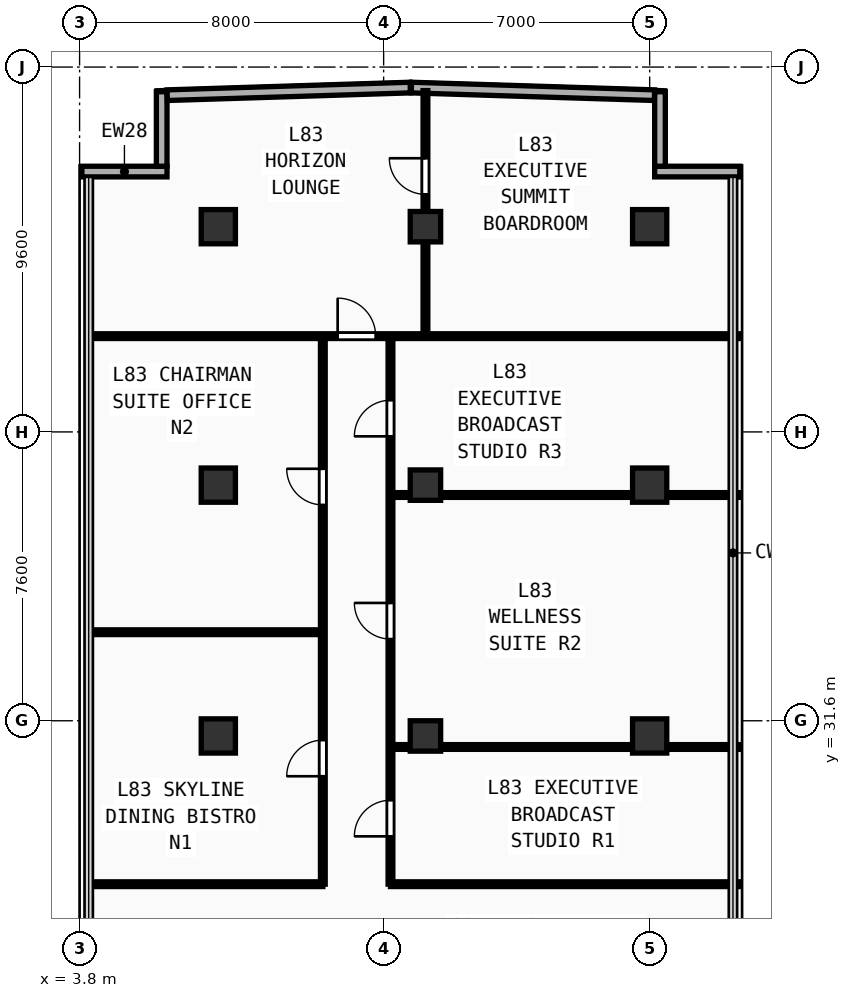
"""IFC4 building model, lengths in metres.
Left out: names, types, materials, properties, quantities, classifications, styles, units other than length and angle.
Written with IfcOpenShell. Run it as: python <this file> out.ifc"""

import sys

from ifc_helpers import new_model, si_unit, direction, frame, frame_2d, origin, origin_2d, place, context, subcontext, project, spatial, rectangle, extrude, element, fill, save


model = new_model("IFC4")
c1 = context("Model", 3, precision=1e-05, world=origin(), true_north=direction((0.0, 1.0)))
c2 = subcontext(c1, "Body", "Model", "MODEL_VIEW")
j1 = project(units=[si_unit("LENGTHUNIT", "METRE"), si_unit("PLANEANGLEUNIT", "RADIAN")], contexts=[c1])
p1 = place(None, origin())
s1 = spatial("IfcSite", under=j1, at=p1, CompositionType="ELEMENT")
p2 = place(p1, origin())
s2 = spatial("IfcBuilding", under=s1, at=p2, CompositionType="ELEMENT")
p3 = place(p2, frame((0.0, 0.0, 323.6)))
s3 = spatial("IfcBuildingStorey", under=s2, at=p3, CompositionType="ELEMENT", Elevation=323.6)
for number, where, z_axis, x_axis in (
    (1, (7.45, 31.2, 0.0), (0.0, 0.0, 1.0), (1.0, 0.0, 0.0)),
    (2, (7.45, 37.8, 0.0), (0.0, 0.0, 1.0), (1.0, 0.0, 0.0)),
    (3, (7.45, 44.6, 0.0), (0.0, 0.0, 1.0), (1.0, 0.0, 0.0)),
    (4, (18.8, 31.2, 0.0), (0.0, 0.0, 1.0), (1.0, 0.0, 0.0)),
    (5, (18.8, 37.8, 0.0), (0.0, 0.0, 1.0), (1.0, 0.0, 0.0)),
    (6, (18.8, 44.6, 0.0), (0.0, 0.0, 1.0), (1.0, 0.0, 0.0)),
):
    element("IfcColumn", number, at=place(p3, frame(where, z_axis=z_axis, x_axis=x_axis)), inside=s3, PredefinedType="COLUMN", context=c2, shape_type="SweptSolid", body=[
        extrude(rectangle(XDim=0.9, YDim=0.9, at=origin_2d()), origin(), (0.0, 0.0, 1.0), 3.56),
    ])
for number, where, z_axis, x_axis in (
    (7, (12.9, 31.2, 0.0), (0.0, 0.0, 1.0), (1.0, 0.0, 0.0)),
    (8, (12.9, 37.8, 0.0), (0.0, 0.0, 1.0), (1.0, 0.0, 0.0)),
    (9, (12.9, 44.6, 0.0), (0.0, 0.0, 1.0), (1.0, 0.0, 0.0)),
):
    element("IfcColumn", number, at=place(p3, frame(where, z_axis=z_axis, x_axis=x_axis)), inside=s3, PredefinedType="COLUMN", context=c2, shape_type="SweptSolid", body=[
        extrude(rectangle(XDim=0.8, YDim=0.8, at=origin_2d()), origin(), (0.0, 0.0, 1.0), 3.56),
    ])
p4 = place(p3, frame((18.932, 46.051, 0.0), z_axis=(0.0, 0.0, 1.0), x_axis=(1.0, 0.0, 0.0)))
e10 = element("IfcWall", 10, at=p4, inside=s3, PredefinedType="SOLIDWALL", context=c2, shape_type="SweptSolid", body=[
    extrude(rectangle(XDim=2.24, YDim=0.28, at=frame_2d((1.12, 0.0))), origin(), (0.0, 0.0, 1.0), 3.56),
])
p5 = place(p3, frame((19.072, 46.19, 0.0), z_axis=(0.0, 0.0, 1.0), x_axis=(0.0, 1.0, 0.0)))
e11 = element("IfcWall", 11, at=p5, inside=s3, PredefinedType="SOLIDWALL", context=c2, shape_type="SweptSolid", body=[
    extrude(rectangle(XDim=1.96, YDim=0.28, at=frame_2d((0.98, 0.0))), origin(), (0.0, 0.0, 1.0), 3.56),
])
p6 = place(p3, frame((3.86, 46.051, 0.0), z_axis=(0.0, 0.0, 1.0), x_axis=(1.0, 0.0, 0.0)))
e12 = element("IfcWall", 12, at=p6, inside=s3, PredefinedType="SOLIDWALL", context=c2, shape_type="SweptSolid", body=[
    extrude(rectangle(XDim=2.24, YDim=0.28, at=frame_2d((1.12, 0.0))), origin(), (0.0, 0.0, 1.0), 3.56),
])
p7 = place(p3, frame((5.96, 46.19, 0.0), z_axis=(0.0, 0.0, 1.0), x_axis=(0.0, 1.0, 0.0)))
e13 = element("IfcWall", 13, at=p7, inside=s3, PredefinedType="SOLIDWALL", context=c2, shape_type="SweptSolid", body=[
    extrude(rectangle(XDim=1.96, YDim=0.28, at=frame_2d((0.98, 0.0))), origin(), (0.0, 0.0, 1.0), 3.56),
])
p8 = place(p3, frame((18.927, 48.06, 0.0), z_axis=(0.0, 0.0, 1.0), x_axis=(-0.999509317804, 0.031322892966, 0.0)))
e14 = element("IfcWall", 14, at=p8, inside=s3, PredefinedType="SOLIDWALL", context=c2, shape_type="SweptSolid", body=[
    extrude(rectangle(XDim=6.399, YDim=0.28, at=frame_2d((3.2, 0.0))), origin(), (0.0, 0.0, 1.0), 3.56),
])
p9 = place(p3, frame((12.501, 48.26, 0.0), z_axis=(0.0, 0.0, 1.0), x_axis=(-0.99950928037, -0.03132408746, 0.0)))
e15 = element("IfcWall", 15, at=p9, inside=s3, PredefinedType="SOLIDWALL", context=c2, shape_type="SweptSolid", body=[
    extrude(rectangle(XDim=6.399, YDim=0.28, at=frame_2d((3.199, 0.0))), origin(), (0.0, 0.0, 1.0), 3.56),
])
p10 = place(p3, frame((4.04, 27.3, 0.0), z_axis=(0.0, 0.0, 1.0), x_axis=(1.0, 0.0, 0.0)))
e16 = element("IfcWall", 16, at=p10, inside=s3, PredefinedType="PARTITIONING", context=c2, shape_type="SweptSolid", body=[
    extrude(rectangle(XDim=6.16, YDim=0.125, at=frame_2d((3.08, 0.0))), origin(), (0.0, 0.0, 1.0), 3.56),
])
p11 = place(p3, frame((10.2, 27.3, 0.0), z_axis=(0.0, 0.0, 1.0), x_axis=(0.0, 1.0, 0.0)))
e17 = element("IfcWall", 17, at=p11, inside=s3, PredefinedType="PARTITIONING", context=c2, shape_type="SweptSolid", body=[
    extrude(rectangle(XDim=14.42, YDim=0.125, at=frame_2d((7.21, 0.0))), origin(), (0.0, 0.0, 1.0), 3.56),
])
p12 = place(p11, frame((2.84, 0.0, 0.0)))
e18 = element("IfcOpeningElement", 18, at=p12, cuts=e17, PredefinedType="OPENING", context=c2, shape_type="SweptSolid", body=[
    extrude(rectangle(XDim=0.95, YDim=2.15, at=frame_2d((0.475, 1.075))), frame((0.0, 0.073, 0.0), z_axis=(0.0, -1.0, 0.0), x_axis=(1.0, 0.0, 0.0)), (0.0, 0.0, 1.0), 0.145),
])
p13 = place(p11, frame((9.98, 0.0, 0.0)))
e19 = element("IfcOpeningElement", 19, at=p13, cuts=e17, PredefinedType="OPENING", context=c2, shape_type="SweptSolid", body=[
    extrude(rectangle(XDim=0.95, YDim=2.15, at=frame_2d((0.475, 1.075))), frame((0.0, 0.073, 0.0), z_axis=(0.0, -1.0, 0.0), x_axis=(1.0, 0.0, 0.0)), (0.0, 0.0, 1.0), 0.145),
])
p14 = place(p3, frame((4.04, 33.93, 0.0), z_axis=(0.0, 0.0, 1.0), x_axis=(1.0, 0.0, 0.0)))
e20 = element("IfcWall", 20, at=p14, inside=s3, PredefinedType="PARTITIONING", context=c2, shape_type="SweptSolid", body=[
    extrude(rectangle(XDim=6.16, YDim=0.125, at=frame_2d((3.08, 0.0))), origin(), (0.0, 0.0, 1.0), 3.56),
])
p15 = place(p3, frame((4.04, 41.72, 0.0), z_axis=(0.0, 0.0, 1.0), x_axis=(1.0, 0.0, 0.0)))
e21 = element("IfcWall", 21, at=p15, inside=s3, PredefinedType="PARTITIONING", context=c2, shape_type="SweptSolid", body=[
    extrude(rectangle(XDim=17.12, YDim=0.125, at=frame_2d((8.56, 0.0))), origin(), (0.0, 0.0, 1.0), 3.56),
])
p16 = place(p15, frame((6.55, 0.0, 0.0)))
e22 = element("IfcOpeningElement", 22, at=p16, cuts=e21, PredefinedType="OPENING", context=c2, shape_type="SweptSolid", body=[
    extrude(rectangle(XDim=1.0, YDim=2.2, at=frame_2d((0.5, 1.1))), frame((0.0, 0.073, 0.0), z_axis=(0.0, -1.0, 0.0), x_axis=(1.0, 0.0, 0.0)), (0.0, 0.0, 1.0), 0.145),
])
p17 = place(p3, frame((12.9, 41.72, 0.0), z_axis=(0.0, 0.0, 1.0), x_axis=(0.0, 1.0, 0.0)))
e23 = element("IfcWall", 23, at=p17, inside=s3, PredefinedType="PARTITIONING", context=c2, shape_type="SweptSolid", body=[
    extrude(rectangle(XDim=6.461, YDim=0.125, at=frame_2d((3.23, 0.0))), origin(), (0.0, 0.0, 1.0), 2.96),
])
p18 = place(p17, frame((3.731, 0.0, 0.0)))
e24 = element("IfcOpeningElement", 24, at=p18, cuts=e23, PredefinedType="OPENING", context=c2, shape_type="SweptSolid", body=[
    extrude(rectangle(XDim=0.95, YDim=2.15, at=frame_2d((0.475, 1.075))), frame((0.0, 0.073, 0.0), z_axis=(0.0, -1.0, 0.0), x_axis=(1.0, 0.0, 0.0)), (0.0, 0.0, 1.0), 0.145),
])
p19 = place(p3, frame((11.98, 27.3, 0.0), z_axis=(0.0, 0.0, 1.0), x_axis=(1.0, 0.0, 0.0)))
e25 = element("IfcWall", 25, at=p19, inside=s3, PredefinedType="PARTITIONING", context=c2, shape_type="SweptSolid", body=[
    extrude(rectangle(XDim=9.18, YDim=0.125, at=frame_2d((4.59, 0.0))), origin(), (0.0, 0.0, 1.0), 3.56),
])
p20 = place(p3, frame((11.98, 27.3, 0.0), z_axis=(0.0, 0.0, 1.0), x_axis=(0.0, 1.0, 0.0)))
e26 = element("IfcWall", 26, at=p20, inside=s3, PredefinedType="PARTITIONING", context=c2, shape_type="SweptSolid", body=[
    extrude(rectangle(XDim=14.42, YDim=0.125, at=frame_2d((7.21, 0.0))), origin(), (0.0, 0.0, 1.0), 3.56),
])
p21 = place(p20, frame((1.259, 0.0, 0.0)))
e27 = element("IfcOpeningElement", 27, at=p21, cuts=e26, PredefinedType="OPENING", context=c2, shape_type="SweptSolid", body=[
    extrude(rectangle(XDim=0.95, YDim=2.15, at=frame_2d((0.475, 1.075))), frame((0.0, 0.073, 0.0), z_axis=(0.0, -1.0, 0.0), x_axis=(1.0, 0.0, 0.0)), (0.0, 0.0, 1.0), 0.145),
])
p22 = place(p20, frame((6.45, 0.0, 0.0)))
e28 = element("IfcOpeningElement", 28, at=p22, cuts=e26, PredefinedType="OPENING", context=c2, shape_type="SweptSolid", body=[
    extrude(rectangle(XDim=0.95, YDim=2.15, at=frame_2d((0.475, 1.075))), frame((0.0, 0.073, 0.0), z_axis=(0.0, -1.0, 0.0), x_axis=(1.0, 0.0, 0.0)), (0.0, 0.0, 1.0), 0.145),
])
p23 = place(p20, frame((11.783, 0.0, 0.0)))
e29 = element("IfcOpeningElement", 29, at=p23, cuts=e26, PredefinedType="OPENING", context=c2, shape_type="SweptSolid", body=[
    extrude(rectangle(XDim=0.95, YDim=2.15, at=frame_2d((0.475, 1.075))), frame((0.0, 0.073, 0.0), z_axis=(0.0, -1.0, 0.0), x_axis=(1.0, 0.0, 0.0)), (0.0, 0.0, 1.0), 0.145),
])
for number, where, z_axis, x_axis in (
    (30, (11.98, 30.91, 0.0), (0.0, 0.0, 1.0), (1.0, 0.0, 0.0)),
    (31, (11.98, 37.54, 0.0), (0.0, 0.0, 1.0), (1.0, 0.0, 0.0)),
):
    element("IfcWall", number, at=place(p3, frame(where, z_axis=z_axis, x_axis=x_axis)), inside=s3, PredefinedType="PARTITIONING", context=c2, shape_type="SweptSolid", body=[
        extrude(rectangle(XDim=9.18, YDim=0.125, at=frame_2d((4.59, 0.0))), origin(), (0.0, 0.0, 1.0), 2.96),
    ])
p24 = place(p12, origin())
e32 = element("IfcDoor", 32, at=p24, inside=s3, OperationType="SINGLE_SWING_LEFT", PredefinedType="DOOR", context=c2, shape_type="SweptSolid", body=[
    extrude(rectangle(XDim=0.95, YDim=2.15, at=frame_2d((0.475, 1.075))), frame((0.0, 0.025, 0.0), z_axis=(0.0, -1.0, 0.0), x_axis=(1.0, 0.0, 0.0)), (0.0, 0.0, 1.0), 0.05),
])
fill(e18, e32)
p25 = place(p13, origin())
e33 = element("IfcDoor", 33, at=p25, inside=s3, OperationType="SINGLE_SWING_RIGHT", PredefinedType="DOOR", context=c2, shape_type="SweptSolid", body=[
    extrude(rectangle(XDim=0.95, YDim=2.15, at=frame_2d((0.475, 1.075))), frame((0.0, 0.025, 0.0), z_axis=(0.0, -1.0, 0.0), x_axis=(1.0, 0.0, 0.0)), (0.0, 0.0, 1.0), 0.05),
])
fill(e19, e33)
p26 = place(p16, origin())
e34 = element("IfcDoor", 34, at=p26, inside=s3, OperationType="SINGLE_SWING_LEFT", PredefinedType="DOOR", context=c2, shape_type="SweptSolid", body=[
    extrude(rectangle(XDim=1.0, YDim=2.2, at=frame_2d((0.5, 1.1))), frame((0.0, 0.025, 0.0), z_axis=(0.0, -1.0, 0.0), x_axis=(1.0, 0.0, 0.0)), (0.0, 0.0, 1.0), 0.05),
])
fill(e22, e34)
p27 = place(p18, origin())
e35 = element("IfcDoor", 35, at=p27, inside=s3, OperationType="SINGLE_SWING_RIGHT", PredefinedType="DOOR", context=c2, shape_type="SweptSolid", body=[
    extrude(rectangle(XDim=0.95, YDim=2.15, at=frame_2d((0.475, 1.075))), frame((0.0, 0.025, 0.0), z_axis=(0.0, -1.0, 0.0), x_axis=(1.0, 0.0, 0.0)), (0.0, 0.0, 1.0), 0.05),
])
fill(e24, e35)
p28 = place(p21, origin())
e36 = element("IfcDoor", 36, at=p28, inside=s3, OperationType="SINGLE_SWING_LEFT", PredefinedType="DOOR", context=c2, shape_type="SweptSolid", body=[
    extrude(rectangle(XDim=0.95, YDim=2.15, at=frame_2d((0.475, 1.075))), frame((0.0, 0.025, 0.0), z_axis=(0.0, -1.0, 0.0), x_axis=(1.0, 0.0, 0.0)), (0.0, 0.0, 1.0), 0.05),
])
fill(e27, e36)
p29 = place(p22, origin())
e37 = element("IfcDoor", 37, at=p29, inside=s3, OperationType="SINGLE_SWING_RIGHT", PredefinedType="DOOR", context=c2, shape_type="SweptSolid", body=[
    extrude(rectangle(XDim=0.95, YDim=2.15, at=frame_2d((0.475, 1.075))), frame((0.0, 0.025, 0.0), z_axis=(0.0, -1.0, 0.0), x_axis=(1.0, 0.0, 0.0)), (0.0, 0.0, 1.0), 0.05),
])
fill(e28, e37)
p30 = place(p23, origin())
e38 = element("IfcDoor", 38, at=p30, inside=s3, OperationType="SINGLE_SWING_LEFT", PredefinedType="DOOR", context=c2, shape_type="SweptSolid", body=[
    extrude(rectangle(XDim=0.95, YDim=2.15, at=frame_2d((0.475, 1.075))), frame((0.0, 0.025, 0.0), z_axis=(0.0, -1.0, 0.0), x_axis=(1.0, 0.0, 0.0)), (0.0, 0.0, 1.0), 0.05),
])
fill(e29, e38)
save(model, sys.argv[1])
